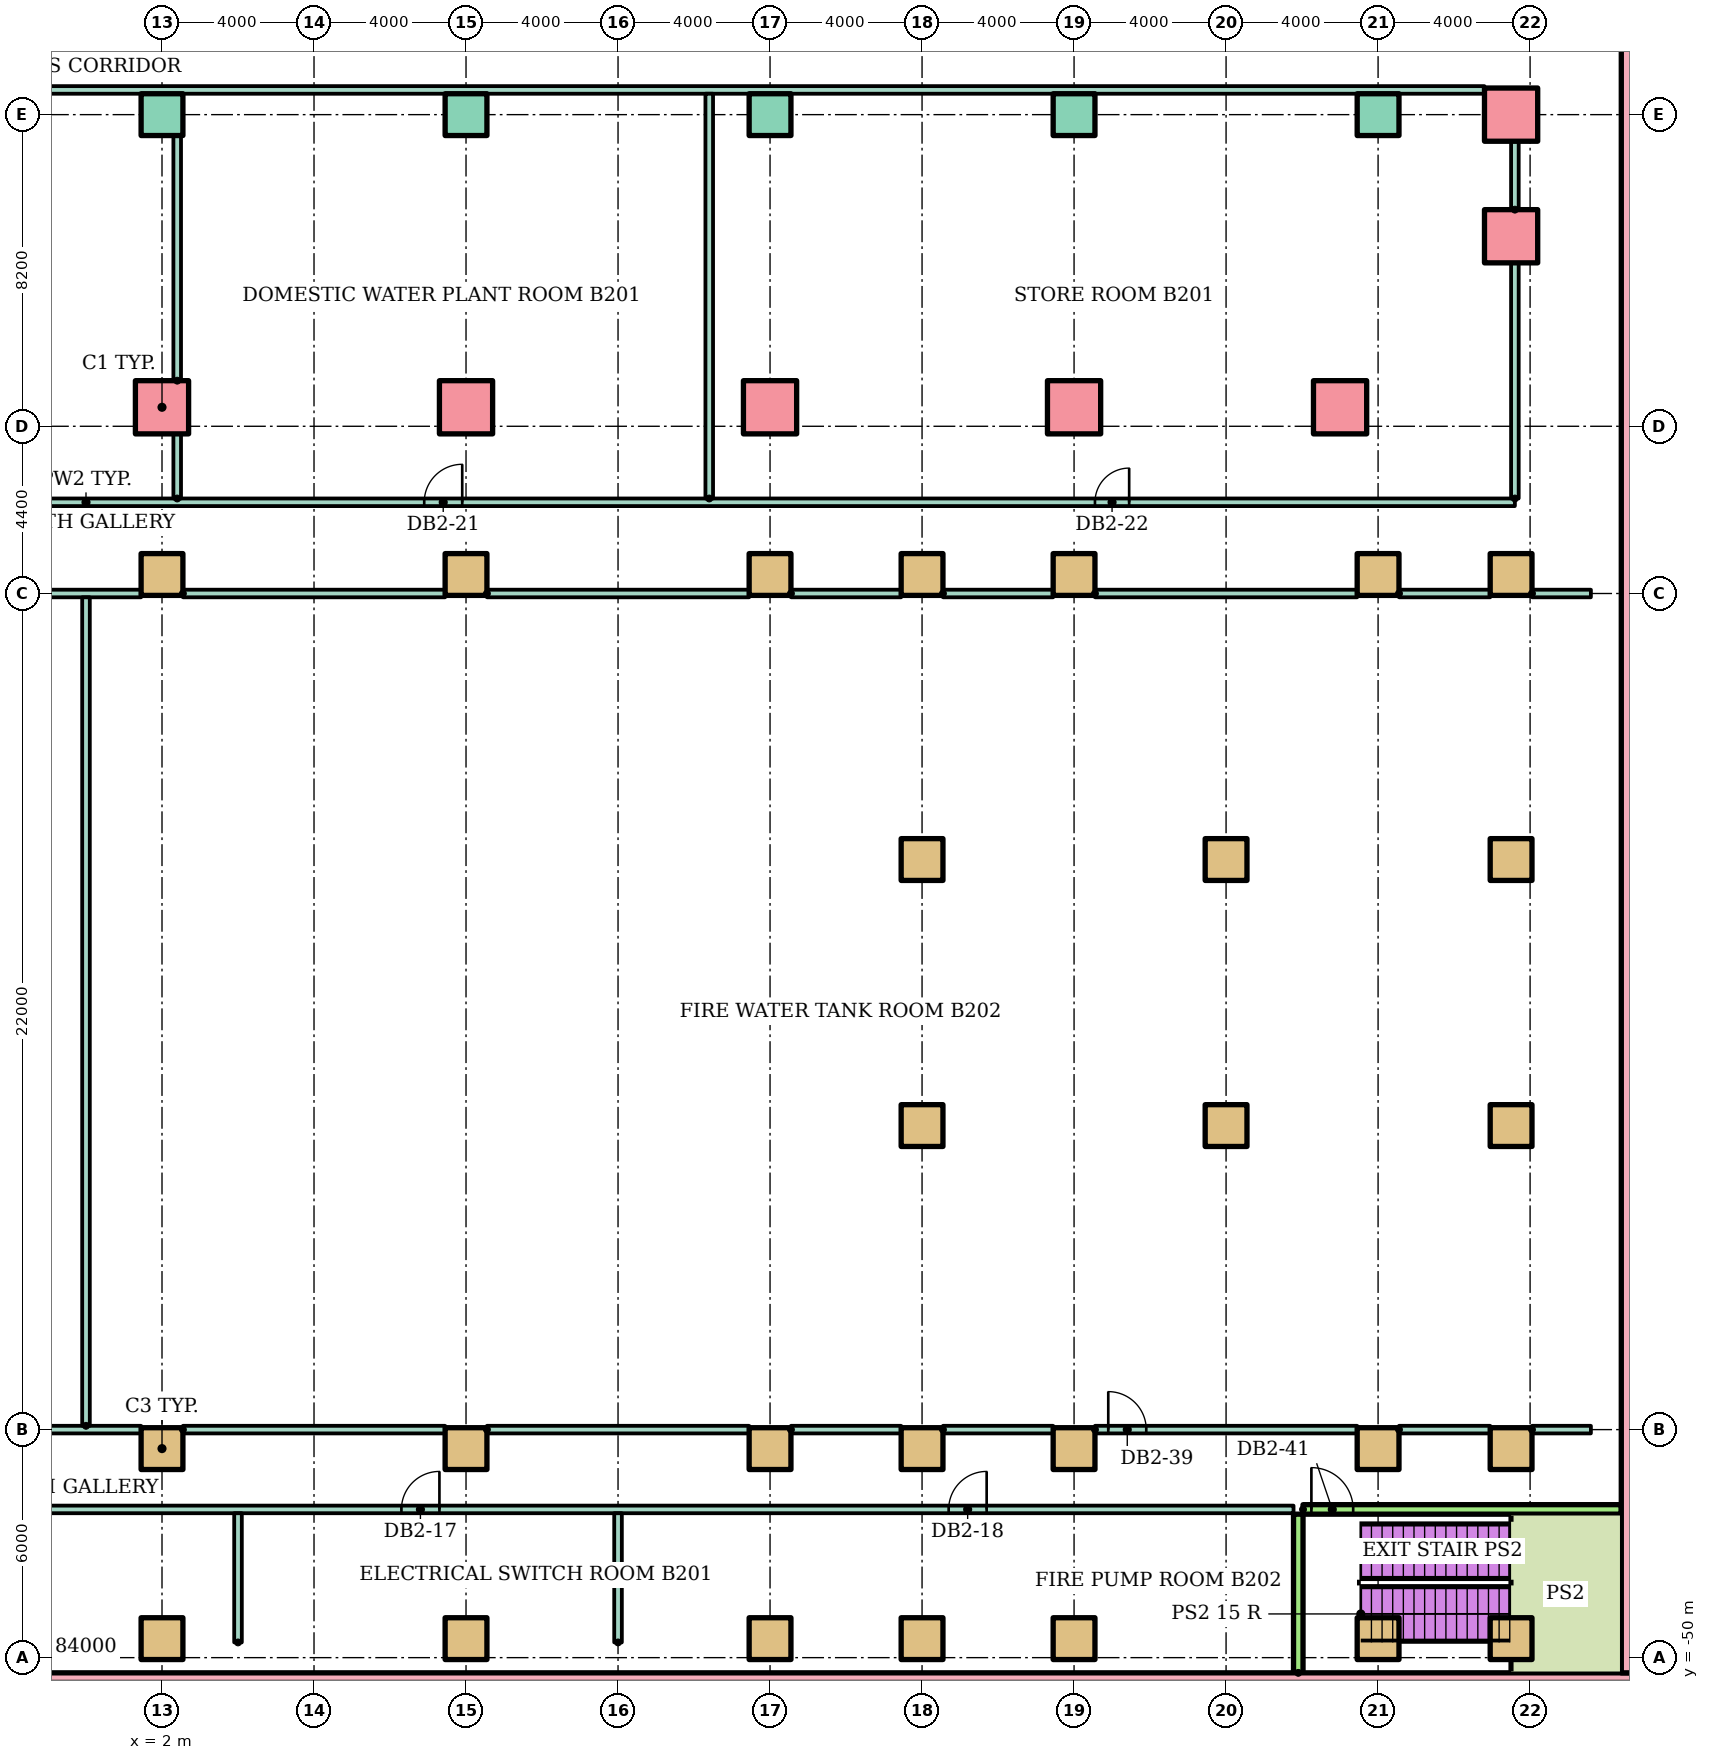
"""IFC4 building model, lengths in metres.
Left out: names, types, materials, properties, quantities, classifications, styles, units other than length and angle.
Written with IfcOpenShell. Run it as: python <this file> out.ifc"""

import sys

from ifc_helpers import new_model, si_unit, direction, frame, frame_2d, origin, origin_2d, place, context, subcontext, project, spatial, rectangle, hollow_rectangle, extrude, element, fill, save


model = new_model("IFC4")
c1 = context("Model", 3, precision=1e-05, world=origin(), true_north=direction((0.0, 1.0)))
c2 = subcontext(c1, "Body", "Model", "MODEL_VIEW")
j1 = project(units=[si_unit("LENGTHUNIT", "METRE"), si_unit("PLANEANGLEUNIT", "RADIAN")], contexts=[c1])
p1 = place(None, origin())
s1 = spatial("IfcSite", under=j1, at=p1, CompositionType="ELEMENT")
p2 = place(p1, origin())
s2 = spatial("IfcBuilding", under=s1, at=p2, CompositionType="ELEMENT")
p3 = place(p2, frame((0.0, 0.0, -10.0)))
s3 = spatial("IfcBuildingStorey", under=s2, at=p3, CompositionType="ELEMENT", Elevation=-10.0)
p4 = place(p3, frame((-41.0, -50.7, -0.3)))
e1 = element("IfcWall", 1, at=p4, inside=s3, PredefinedType="SOLIDWALL", context=c2, shape_type="SweptSolid", body=[
    extrude(rectangle(XDim=82.0, YDim=0.6, at=frame_2d((41.0, 0.0))), origin(), (0.0, 0.0, 1.0), 4.95),
])
p5 = place(p3, frame((40.7, -50.4, -0.3), z_axis=(0.0, 0.0, 1.0), x_axis=(0.0, 1.0, 0.0)))
e2 = element("IfcWall", 2, at=p5, inside=s3, PredefinedType="SOLIDWALL", context=c2, shape_type="SweptSolid", body=[
    extrude(rectangle(XDim=70.8, YDim=0.6, at=frame_2d((35.4, 0.0))), origin(), (0.0, 0.0, 1.0), 4.95),
])
for number, where in (
    (3, (2.0, -17.1, -0.3)),
    (4, (10.0, -17.1, -0.3)),
    (5, (18.0, -17.1, -0.3)),
    (6, (26.0, -17.1, -0.3)),
    (7, (33.0, -17.1, -0.3)),
    (8, (37.5, -12.6, -0.3)),
):
    element("IfcColumn", number, at=place(p3, frame(where)), inside=s3, PredefinedType="COLUMN", context=c2, shape_type="SweptSolid", body=[
        extrude(hollow_rectangle(XDim=1.4, YDim=1.4, WallThickness=0.08, at=origin_2d()), origin(), (0.0, 0.0, 1.0), 5.3),
    ])
for number, where in (
    (9, (2.0, -9.4, -0.3)),
    (10, (10.0, -9.4, -0.3)),
    (11, (18.0, -9.4, -0.3)),
    (12, (26.0, -9.4, -0.3)),
    (13, (34.0, -9.4, -0.3)),
):
    element("IfcColumn", number, at=place(p3, frame(where)), inside=s3, PredefinedType="COLUMN", context=c2, shape_type="SweptSolid", body=[
        extrude(rectangle(XDim=1.1, YDim=1.1, at=origin_2d()), origin(), (0.0, 0.0, 1.0), 5.3),
    ])
p6 = place(p3, frame((37.5, -9.4, -0.3)))
e14 = element("IfcColumn", 14, at=p6, inside=s3, PredefinedType="COLUMN", context=c2, shape_type="SweptSolid", body=[
    extrude(hollow_rectangle(XDim=1.4, YDim=1.4, WallThickness=0.08, at=origin_2d()), origin(), (0.0, 0.0, 1.0), 5.3),
])
for number, where in (
    (15, (2.0, -49.5, -0.3)),
    (16, (10.0, -49.5, -0.3)),
    (17, (18.0, -49.5, -0.3)),
    (18, (22.0, -49.5, -0.3)),
    (19, (26.0, -49.5, -0.3)),
    (20, (34.0, -49.5, -0.3)),
    (21, (37.5, -49.5, -0.3)),
    (22, (2.0, -44.5, -0.3)),
    (23, (10.0, -44.5, -0.3)),
    (24, (18.0, -44.5, -0.3)),
    (25, (22.0, -44.5, -0.3)),
    (26, (26.0, -44.5, -0.3)),
    (27, (34.0, -44.5, -0.3)),
    (28, (37.5, -44.5, -0.3)),
    (29, (22.0, -36.0, -0.3)),
    (30, (30.0, -36.0, -0.3)),
    (31, (37.5, -36.0, -0.3)),
    (32, (22.0, -29.0, -0.3)),
    (33, (30.0, -29.0, -0.3)),
    (34, (37.5, -29.0, -0.3)),
    (35, (2.0, -21.5, -0.3)),
    (36, (10.0, -21.5, -0.3)),
    (37, (18.0, -21.5, -0.3)),
    (38, (22.0, -21.5, -0.3)),
    (39, (26.0, -21.5, -0.3)),
    (40, (34.0, -21.5, -0.3)),
    (41, (37.5, -21.5, -0.3)),
):
    element("IfcColumn", number, at=place(p3, frame(where)), inside=s3, PredefinedType="COLUMN", context=c2, shape_type="SweptSolid", body=[
        extrude(rectangle(XDim=1.1, YDim=1.1, at=origin_2d()), origin(), (0.0, 0.0, 1.0), 5.3),
    ])
p7 = place(p3, frame((-31.775, -46.1, 0.0)))
e42 = element("IfcWall", 42, at=p7, inside=s3, PredefinedType="PARTITIONING", context=c2, shape_type="SweptSolid", body=[
    extrude(rectangle(XDim=63.55, YDim=0.2, at=frame_2d((31.775, 0.0))), origin(), (0.0, 0.0, 1.0), 4.65),
])
p8 = place(p7, frame((4.375, 0.0, 0.0)))
e43 = element("IfcOpeningElement", 43, at=p8, cuts=e42, PredefinedType="OPENING", context=c2, shape_type="SweptSolid", body=[
    extrude(rectangle(XDim=1.0, YDim=2.1, at=frame_2d((0.5, 1.05))), frame((0.0, 0.11, 0.0), z_axis=(0.0, -1.0, 0.0), x_axis=(1.0, 0.0, 0.0)), (0.0, 0.0, 1.0), 0.22),
])
p9 = place(p7, frame((18.475, 0.0, 0.0)))
e44 = element("IfcOpeningElement", 44, at=p9, cuts=e42, PredefinedType="OPENING", context=c2, shape_type="SweptSolid", body=[
    extrude(rectangle(XDim=0.9, YDim=2.1, at=frame_2d((0.45, 1.05))), frame((0.0, 0.11, 0.0), z_axis=(0.0, -1.0, 0.0), x_axis=(1.0, 0.0, 0.0)), (0.0, 0.0, 1.0), 0.22),
])
p10 = place(p7, frame((40.075, 0.0, 0.0)))
e45 = element("IfcOpeningElement", 45, at=p10, cuts=e42, PredefinedType="OPENING", context=c2, shape_type="SweptSolid", body=[
    extrude(rectangle(XDim=1.0, YDim=2.1, at=frame_2d((0.5, 1.05))), frame((0.0, 0.11, 0.0), z_axis=(0.0, -1.0, 0.0), x_axis=(1.0, 0.0, 0.0)), (0.0, 0.0, 1.0), 0.22),
])
p11 = place(p7, frame((54.475, 0.0, 0.0)))
e46 = element("IfcOpeningElement", 46, at=p11, cuts=e42, PredefinedType="OPENING", context=c2, shape_type="SweptSolid", body=[
    extrude(rectangle(XDim=1.0, YDim=2.1, at=frame_2d((0.5, 1.05))), frame((0.0, 0.11, 0.0), z_axis=(0.0, -1.0, 0.0), x_axis=(1.0, 0.0, 0.0)), (0.0, 0.0, 1.0), 0.22),
])
p12 = place(p3, frame((32.025, -46.1, 0.0)))
e47 = element("IfcWall", 47, at=p12, inside=s3, PredefinedType="SOLIDWALL", context=c2, shape_type="SweptSolid", body=[
    extrude(rectangle(XDim=8.375, YDim=0.25, at=frame_2d((4.188, 0.0))), origin(), (0.0, 0.0, 1.0), 4.65),
])
p13 = place(p12, frame((0.22, 0.0, 0.0)))
e48 = element("IfcOpeningElement", 48, at=p13, cuts=e47, PredefinedType="OPENING", context=c2, shape_type="SweptSolid", body=[
    extrude(rectangle(XDim=1.1, YDim=2.1, at=frame_2d((0.55, 1.05))), frame((0.0, 0.135, 0.0), z_axis=(0.0, -1.0, 0.0), x_axis=(1.0, 0.0, 0.0)), (0.0, 0.0, 1.0), 0.27),
])
for number, where in (
    (49, (-5.45, -44.0, 0.0)),
    (50, (2.55, -44.0, 0.0)),
    (51, (10.55, -44.0, 0.0)),
):
    element("IfcWall", number, at=place(p3, frame(where)), inside=s3, PredefinedType="PARTITIONING", context=c2, shape_type="SweptSolid", body=[
        extrude(rectangle(XDim=6.9, YDim=0.2, at=frame_2d((3.45, 0.0))), origin(), (0.0, 0.0, 1.0), 4.65),
    ])
for number, where in (
    (52, (18.55, -44.0, 0.0)),
    (53, (22.55, -44.0, 0.0)),
):
    element("IfcWall", number, at=place(p3, frame(where)), inside=s3, PredefinedType="PARTITIONING", context=c2, shape_type="SweptSolid", body=[
        extrude(rectangle(XDim=2.9, YDim=0.2, at=frame_2d((1.45, 0.0))), origin(), (0.0, 0.0, 1.0), 4.65),
    ])
p14 = place(p3, frame((26.55, -44.0, 0.0)))
e54 = element("IfcWall", 54, at=p14, inside=s3, PredefinedType="PARTITIONING", context=c2, shape_type="SweptSolid", body=[
    extrude(rectangle(XDim=6.9, YDim=0.2, at=frame_2d((3.45, 0.0))), origin(), (0.0, 0.0, 1.0), 4.65),
])
p15 = place(p14, frame((0.35, 0.0, 0.0)))
e55 = element("IfcOpeningElement", 55, at=p15, cuts=e54, PredefinedType="OPENING", context=c2, shape_type="SweptSolid", body=[
    extrude(rectangle(XDim=1.0, YDim=2.1, at=frame_2d((0.5, 1.05))), frame((0.0, 0.11, 0.0), z_axis=(0.0, -1.0, 0.0), x_axis=(1.0, 0.0, 0.0)), (0.0, 0.0, 1.0), 0.22),
])
p16 = place(p3, frame((34.55, -44.0, 0.0)))
e56 = element("IfcWall", 56, at=p16, inside=s3, PredefinedType="PARTITIONING", context=c2, shape_type="SweptSolid", body=[
    extrude(rectangle(XDim=2.4, YDim=0.2, at=frame_2d((1.2, 0.0))), origin(), (0.0, 0.0, 1.0), 4.65),
])
p17 = place(p3, frame((38.05, -44.0, 0.0)))
e57 = element("IfcWall", 57, at=p17, inside=s3, PredefinedType="PARTITIONING", context=c2, shape_type="SweptSolid", body=[
    extrude(rectangle(XDim=1.55, YDim=0.2, at=frame_2d((0.775, 0.0))), origin(), (0.0, 0.0, 1.0), 4.65),
])
for number, where in (
    (58, (-5.45, -22.0, 0.0)),
    (59, (2.55, -22.0, 0.0)),
    (60, (10.55, -22.0, 0.0)),
):
    element("IfcWall", number, at=place(p3, frame(where)), inside=s3, PredefinedType="PARTITIONING", context=c2, shape_type="SweptSolid", body=[
        extrude(rectangle(XDim=6.9, YDim=0.2, at=frame_2d((3.45, 0.0))), origin(), (0.0, 0.0, 1.0), 4.65),
    ])
for number, where in (
    (61, (18.55, -22.0, 0.0)),
    (62, (22.55, -22.0, 0.0)),
):
    element("IfcWall", number, at=place(p3, frame(where)), inside=s3, PredefinedType="PARTITIONING", context=c2, shape_type="SweptSolid", body=[
        extrude(rectangle(XDim=2.9, YDim=0.2, at=frame_2d((1.45, 0.0))), origin(), (0.0, 0.0, 1.0), 4.65),
    ])
p18 = place(p3, frame((26.55, -22.0, 0.0)))
e63 = element("IfcWall", 63, at=p18, inside=s3, PredefinedType="PARTITIONING", context=c2, shape_type="SweptSolid", body=[
    extrude(rectangle(XDim=6.9, YDim=0.2, at=frame_2d((3.45, 0.0))), origin(), (0.0, 0.0, 1.0), 4.65),
])
p19 = place(p3, frame((34.55, -22.0, 0.0)))
e64 = element("IfcWall", 64, at=p19, inside=s3, PredefinedType="PARTITIONING", context=c2, shape_type="SweptSolid", body=[
    extrude(rectangle(XDim=2.4, YDim=0.2, at=frame_2d((1.2, 0.0))), origin(), (0.0, 0.0, 1.0), 4.65),
])
p20 = place(p3, frame((38.05, -22.0, 0.0)))
e65 = element("IfcWall", 65, at=p20, inside=s3, PredefinedType="PARTITIONING", context=c2, shape_type="SweptSolid", body=[
    extrude(rectangle(XDim=1.55, YDim=0.2, at=frame_2d((0.775, 0.0))), origin(), (0.0, 0.0, 1.0), 4.65),
])
p21 = place(p3, frame((-37.6, -19.6, 0.0)))
e66 = element("IfcWall", 66, at=p21, inside=s3, PredefinedType="PARTITIONING", context=c2, shape_type="SweptSolid", body=[
    extrude(rectangle(XDim=75.2, YDim=0.2, at=frame_2d((37.6, 0.0))), origin(), (0.0, 0.0, 1.0), 4.65),
])
p22 = place(p21, frame((9.3, 0.0, 0.0)))
e67 = element("IfcOpeningElement", 67, at=p22, cuts=e66, PredefinedType="OPENING", context=c2, shape_type="SweptSolid", body=[
    extrude(rectangle(XDim=1.4, YDim=2.1, at=frame_2d((0.7, 1.05))), frame((0.0, 0.11, 0.0), z_axis=(0.0, -1.0, 0.0), x_axis=(1.0, 0.0, 0.0)), (0.0, 0.0, 1.0), 0.22),
])
p23 = place(p21, frame((29.3, 0.0, 0.0)))
e68 = element("IfcOpeningElement", 68, at=p23, cuts=e66, PredefinedType="OPENING", context=c2, shape_type="SweptSolid", body=[
    extrude(rectangle(XDim=1.4, YDim=2.1, at=frame_2d((0.7, 1.05))), frame((0.0, 0.11, 0.0), z_axis=(0.0, -1.0, 0.0), x_axis=(1.0, 0.0, 0.0)), (0.0, 0.0, 1.0), 0.22),
])
p24 = place(p21, frame((46.5, 0.0, 0.0)))
e69 = element("IfcOpeningElement", 69, at=p24, cuts=e66, PredefinedType="OPENING", context=c2, shape_type="SweptSolid", body=[
    extrude(rectangle(XDim=1.0, YDim=2.1, at=frame_2d((0.5, 1.05))), frame((0.0, 0.11, 0.0), z_axis=(0.0, -1.0, 0.0), x_axis=(1.0, 0.0, 0.0)), (0.0, 0.0, 1.0), 0.22),
])
p25 = place(p21, frame((64.15, 0.0, 0.0)))
e70 = element("IfcOpeningElement", 70, at=p25, cuts=e66, PredefinedType="OPENING", context=c2, shape_type="SweptSolid", body=[
    extrude(rectangle(XDim=0.9, YDim=2.1, at=frame_2d((0.45, 1.05))), frame((0.0, 0.11, 0.0), z_axis=(0.0, -1.0, 0.0), x_axis=(1.0, 0.0, 0.0)), (0.0, 0.0, 1.0), 0.22),
])
p26 = place(p3, frame((-36.8, -8.75, 0.0)))
e71 = element("IfcWall", 71, at=p26, inside=s3, PredefinedType="PARTITIONING", context=c2, shape_type="SweptSolid", body=[
    extrude(rectangle(XDim=73.6, YDim=0.2, at=frame_2d((36.8, 0.0))), origin(), (0.0, 0.0, 1.0), 4.65),
])
p27 = place(p3, frame((0.0, -43.9, 0.0), z_axis=(0.0, 0.0, 1.0), x_axis=(0.0, 1.0, 0.0)))
e72 = element("IfcWall", 72, at=p27, inside=s3, PredefinedType="PARTITIONING", context=c2, shape_type="SweptSolid", body=[
    extrude(rectangle(XDim=21.8, YDim=0.2, at=frame_2d((10.9, 0.0))), origin(), (0.0, 0.0, 1.0), 4.65),
])
p28 = place(p3, frame((2.4, -19.5, 0.0), z_axis=(0.0, 0.0, 1.0), x_axis=(0.0, 1.0, 0.0)))
e73 = element("IfcWall", 73, at=p28, inside=s3, PredefinedType="PARTITIONING", context=c2, shape_type="SweptSolid", body=[
    extrude(rectangle(XDim=1.7, YDim=0.2, at=frame_2d((0.85, 0.0))), origin(), (0.0, 0.0, 1.0), 4.65),
])
p29 = place(p3, frame((2.4, -16.4, 0.0), z_axis=(0.0, 0.0, 1.0), x_axis=(0.0, 1.0, 0.0)))
e74 = element("IfcWall", 74, at=p29, inside=s3, PredefinedType="PARTITIONING", context=c2, shape_type="SweptSolid", body=[
    extrude(rectangle(XDim=6.45, YDim=0.2, at=frame_2d((3.225, 0.0))), origin(), (0.0, 0.0, 1.0), 4.65),
])
for number, where, z_axis, x_axis in (
    (75, (4.0, -49.6, 0.0), (0.0, 0.0, 1.0), (0.0, 1.0, 0.0)),
    (76, (14.0, -49.6, 0.0), (0.0, 0.0, 1.0), (0.0, 1.0, 0.0)),
):
    element("IfcWall", number, at=place(p3, frame(where, z_axis=z_axis, x_axis=x_axis)), inside=s3, PredefinedType="PARTITIONING", context=c2, shape_type="SweptSolid", body=[
        extrude(rectangle(XDim=3.4, YDim=0.2, at=frame_2d((1.7, 0.0))), origin(), (0.0, 0.0, 1.0), 4.65),
    ])
p30 = place(p3, frame((16.4, -19.5, 0.0), z_axis=(0.0, 0.0, 1.0), x_axis=(0.0, 1.0, 0.0)))
e77 = element("IfcWall", 77, at=p30, inside=s3, PredefinedType="PARTITIONING", context=c2, shape_type="SweptSolid", body=[
    extrude(rectangle(XDim=10.65, YDim=0.2, at=frame_2d((5.325, 0.0))), origin(), (0.0, 0.0, 1.0), 4.65),
])
p31 = place(p3, frame((31.9, -50.4, 0.0), z_axis=(0.0, 0.0, 1.0), x_axis=(0.0, 1.0, 0.0)))
e78 = element("IfcWall", 78, at=p31, inside=s3, PredefinedType="SOLIDWALL", context=c2, shape_type="SweptSolid", body=[
    extrude(rectangle(XDim=4.175, YDim=0.25, at=frame_2d((2.087, 0.0))), origin(), (0.0, 0.0, 1.0), 4.65),
])
p32 = place(p3, frame((37.6, -19.5, 0.0), z_axis=(0.0, 0.0, 1.0), x_axis=(0.0, 1.0, 0.0)))
e79 = element("IfcWall", 79, at=p32, inside=s3, PredefinedType="PARTITIONING", context=c2, shape_type="SweptSolid", body=[
    extrude(rectangle(XDim=6.2, YDim=0.2, at=frame_2d((3.1, 0.0))), origin(), (0.0, 0.0, 1.0), 4.65),
])
p33 = place(p3, frame((37.6, -11.9, 0.0), z_axis=(0.0, 0.0, 1.0), x_axis=(0.0, 1.0, 0.0)))
e80 = element("IfcWall", 80, at=p33, inside=s3, PredefinedType="PARTITIONING", context=c2, shape_type="SweptSolid", body=[
    extrude(rectangle(XDim=1.8, YDim=0.2, at=frame_2d((0.9, 0.0))), origin(), (0.0, 0.0, 1.0), 4.65),
])
p34 = place(p10, origin())
e81 = element("IfcDoor", 81, at=p34, inside=s3, OperationType="SINGLE_SWING_RIGHT", PredefinedType="DOOR", context=c2, shape_type="SweptSolid", body=[
    extrude(rectangle(XDim=1.0, YDim=2.1, at=frame_2d((0.5, 1.05))), frame((0.0, 0.025, 0.0), z_axis=(0.0, -1.0, 0.0), x_axis=(1.0, 0.0, 0.0)), (0.0, 0.0, 1.0), 0.05),
])
fill(e45, e81)
p35 = place(p11, origin())
e82 = element("IfcDoor", 82, at=p35, inside=s3, OperationType="SINGLE_SWING_RIGHT", PredefinedType="DOOR", context=c2, shape_type="SweptSolid", body=[
    extrude(rectangle(XDim=1.0, YDim=2.1, at=frame_2d((0.5, 1.05))), frame((0.0, 0.025, 0.0), z_axis=(0.0, -1.0, 0.0), x_axis=(1.0, 0.0, 0.0)), (0.0, 0.0, 1.0), 0.05),
])
fill(e46, e82)
p36 = place(p24, origin())
e83 = element("IfcDoor", 83, at=p36, inside=s3, OperationType="SINGLE_SWING_RIGHT", PredefinedType="DOOR", context=c2, shape_type="SweptSolid", body=[
    extrude(rectangle(XDim=1.0, YDim=2.1, at=frame_2d((0.5, 1.05))), frame((0.0, 0.025, 0.0), z_axis=(0.0, -1.0, 0.0), x_axis=(1.0, 0.0, 0.0)), (0.0, 0.0, 1.0), 0.05),
])
fill(e69, e83)
p37 = place(p25, origin())
e84 = element("IfcDoor", 84, at=p37, inside=s3, OperationType="SINGLE_SWING_RIGHT", PredefinedType="DOOR", context=c2, shape_type="SweptSolid", body=[
    extrude(rectangle(XDim=0.9, YDim=2.1, at=frame_2d((0.45, 1.05))), frame((0.0, 0.025, 0.0), z_axis=(0.0, -1.0, 0.0), x_axis=(1.0, 0.0, 0.0)), (0.0, 0.0, 1.0), 0.05),
])
fill(e70, e84)
p38 = place(p15, origin())
e85 = element("IfcDoor", 85, at=p38, inside=s3, OperationType="SINGLE_SWING_LEFT", PredefinedType="DOOR", context=c2, shape_type="SweptSolid", body=[
    extrude(rectangle(XDim=1.0, YDim=2.1, at=frame_2d((0.5, 1.05))), frame((0.0, 0.025, 0.0), z_axis=(0.0, -1.0, 0.0), x_axis=(1.0, 0.0, 0.0)), (0.0, 0.0, 1.0), 0.05),
])
fill(e55, e85)
p39 = place(p13, origin())
e86 = element("IfcDoor", 86, at=p39, inside=s3, OperationType="SINGLE_SWING_LEFT", PredefinedType="DOOR", context=c2, shape_type="SweptSolid", body=[
    extrude(rectangle(XDim=1.1, YDim=2.1, at=frame_2d((0.55, 1.05))), frame((0.0, 0.025, 0.0), z_axis=(0.0, -1.0, 0.0), x_axis=(1.0, 0.0, 0.0)), (0.0, 0.0, 1.0), 0.05),
])
fill(e48, e86)
save(model, sys.argv[1])
